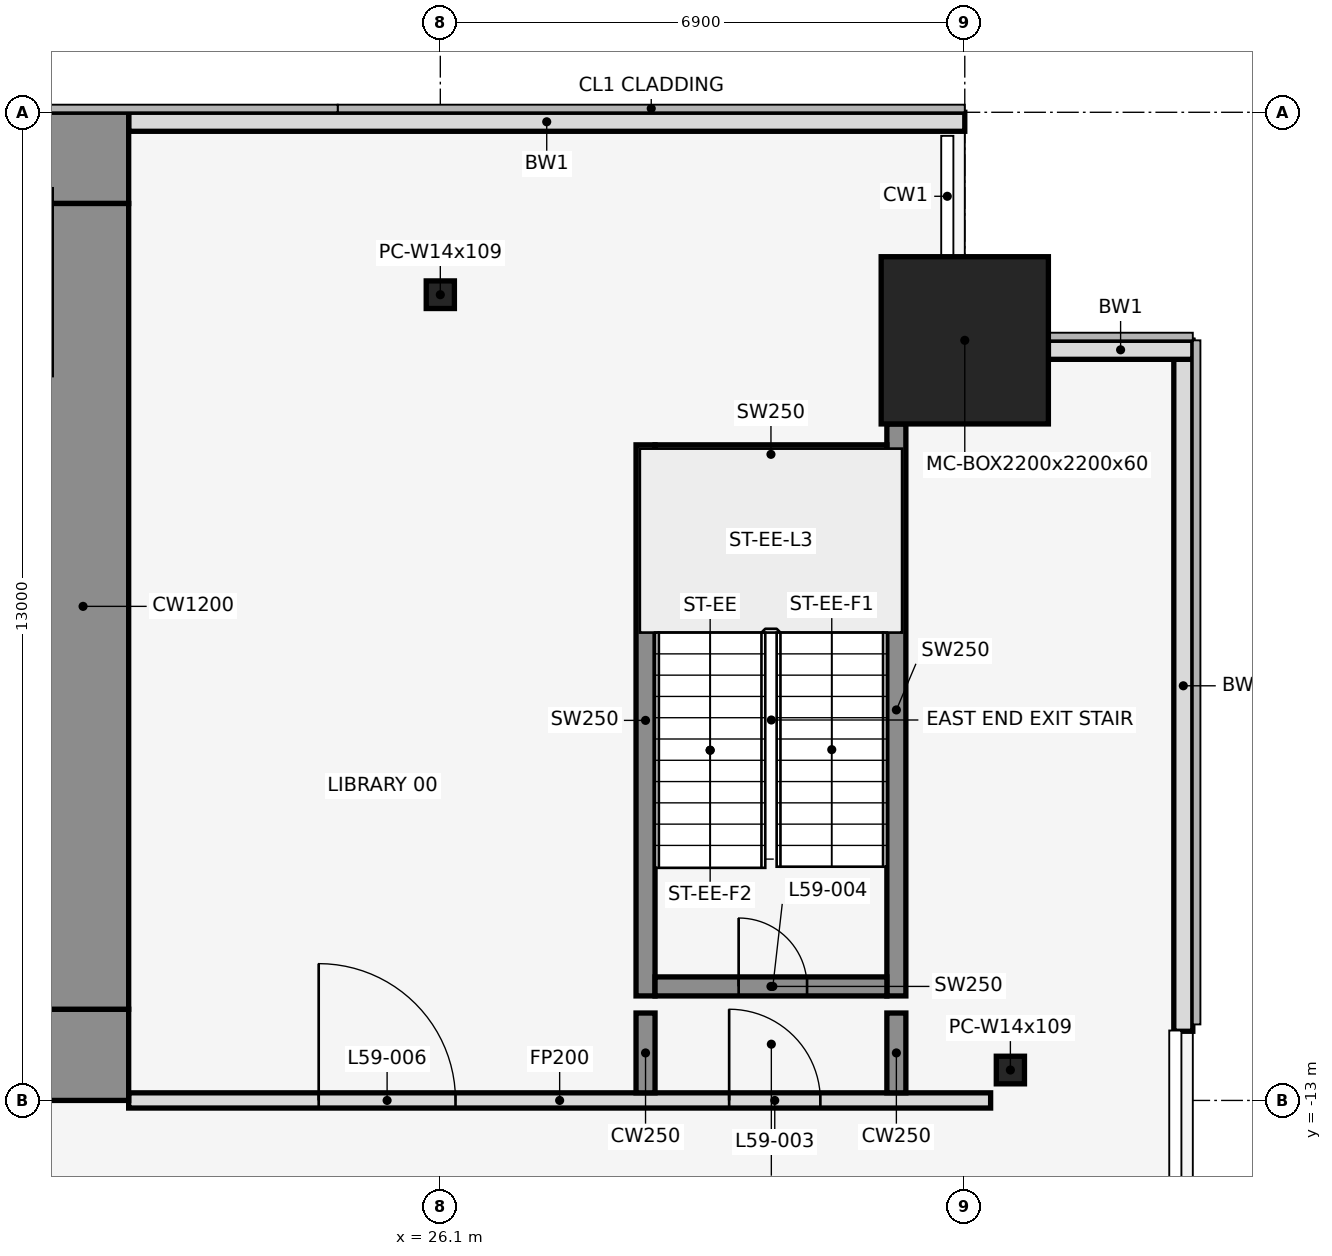
"""IFC4 building model, lengths in metres.
Left out: names, types, materials, properties, quantities, classifications, styles, units other than length and angle.
Written with IfcOpenShell. Run it as: python <this file> out.ifc"""

import sys

from ifc_helpers import new_model, si_unit, direction, frame, frame_2d, origin, origin_2d, place, context, subcontext, project, spatial, rectangle, hollow_rectangle, i_section, extrude, element, fill, save


model = new_model("IFC4")
c1 = context("Model", 3, precision=1e-05, world=origin(), true_north=direction((0.0, 1.0)))
c2 = subcontext(c1, "Body", "Model", "MODEL_VIEW")
j1 = project(units=[si_unit("LENGTHUNIT", "METRE"), si_unit("PLANEANGLEUNIT", "RADIAN")], contexts=[c1])
p1 = place(None, origin())
s1 = spatial("IfcSite", under=j1, at=p1, CompositionType="ELEMENT")
p2 = place(p1, origin())
s2 = spatial("IfcBuilding", under=s1, at=p2, CompositionType="ELEMENT")
p3 = place(p2, frame((0.0, 0.0, 262.4)))
s3 = spatial("IfcBuildingStorey", under=s2, at=p3, CompositionType="ELEMENT", Elevation=262.4)
p4 = place(p3, frame((26.1, -2.4, 0.0), z_axis=(0.0, 0.0, 1.0), x_axis=(1.0, 0.0, 0.0)))
e1 = element("IfcColumn", 1, at=p4, inside=s3, PredefinedType="COLUMN", context=c2, shape_type="SweptSolid", body=[
    extrude(i_section(OverallWidth=0.371, OverallDepth=0.363, WebThickness=0.013, FlangeThickness=0.022, at=origin_2d()), origin(), (0.0, 0.0, 1.0), 4.2),
])
p5 = place(p3, frame((33.0, -3.0, 0.0), z_axis=(0.0, 0.0, 1.0), x_axis=(1.0, 0.0, 0.0)))
e2 = element("IfcColumn", 2, at=p5, inside=s3, PredefinedType="COLUMN", context=c2, shape_type="SweptSolid", body=[
    extrude(hollow_rectangle(XDim=2.2, YDim=2.2, WallThickness=0.06, at=origin_2d()), origin(), (0.0, 0.0, 1.0), 4.2),
])
p6 = place(p3, frame((33.6, -12.6, 0.0), z_axis=(0.0, 0.0, 1.0), x_axis=(1.0, 0.0, 0.0)))
e3 = element("IfcColumn", 3, at=p6, inside=s3, PredefinedType="COLUMN", context=c2, shape_type="SweptSolid", body=[
    extrude(i_section(OverallWidth=0.371, OverallDepth=0.363, WebThickness=0.013, FlangeThickness=0.022, at=origin_2d()), origin(), (0.0, 0.0, 1.0), 4.2),
])
p7 = place(p3, frame((33.0, -0.125, 0.0), z_axis=(0.0, 0.0, 1.0), x_axis=(-1.0, 0.0, 0.0)))
e4 = element("IfcWall", 4, at=p7, inside=s3, PredefinedType="STANDARD", context=c2, shape_type="SweptSolid", body=[
    extrude(rectangle(XDim=11.0, YDim=0.25, at=frame_2d((5.5, 0.0))), origin(), (0.0, 0.0, 1.0), 4.05),
])
p8 = place(p3, frame((35.875, -12.09, 0.0), z_axis=(0.0, 0.0, 1.0), x_axis=(0.0, 1.0, 0.0)))
e5 = element("IfcWall", 5, at=p8, inside=s3, PredefinedType="STANDARD", context=c2, shape_type="SweptSolid", body=[
    extrude(rectangle(XDim=9.09, YDim=0.25, at=frame_2d((4.545, 0.0))), origin(), (0.0, 0.0, 1.0), 4.05),
])
p9 = place(p3, frame((36.0, -3.125, 0.0), z_axis=(0.0, 0.0, 1.0), x_axis=(-1.0, 0.0, 0.0)))
e6 = element("IfcWall", 6, at=p9, inside=s3, PredefinedType="STANDARD", context=c2, shape_type="SweptSolid", body=[
    extrude(rectangle(XDim=1.9, YDim=0.25, at=frame_2d((0.95, 0.0))), origin(), (0.0, 0.0, 1.0), 4.05),
])
p10 = place(p3, frame((28.8, -11.625, 0.0), z_axis=(0.0, 0.0, 1.0), x_axis=(0.0, 1.0, 0.0)))
e7 = element("IfcWall", 7, at=p10, inside=s3, PredefinedType="SHEAR", context=c2, shape_type="SweptSolid", body=[
    extrude(rectangle(XDim=7.25, YDim=0.25, at=frame_2d((3.625, 0.0))), origin(), (0.0, 0.0, 1.0), 4.2),
])
p11 = place(p3, frame((32.1, -11.625, 0.0), z_axis=(0.0, 0.0, 1.0), x_axis=(0.0, 1.0, 0.0)))
e8 = element("IfcWall", 8, at=p11, inside=s3, PredefinedType="SHEAR", context=c2, shape_type="SweptSolid", body=[
    extrude(rectangle(XDim=7.525, YDim=0.25, at=frame_2d((3.762, 0.0))), origin(), (0.0, 0.0, 1.0), 4.2),
])
p12 = place(p3, frame((28.925, -11.5, 0.0), z_axis=(0.0, 0.0, 1.0), x_axis=(1.0, 0.0, 0.0)))
e9 = element("IfcWall", 9, at=p12, inside=s3, PredefinedType="SHEAR", context=c2, shape_type="SweptSolid", body=[
    extrude(rectangle(XDim=3.05, YDim=0.25, at=frame_2d((1.525, 0.0))), origin(), (0.0, 0.0, 1.0), 4.2),
])
p13 = place(p12, frame((1.1, 0.0, 0.0)))
e10 = element("IfcOpeningElement", 10, at=p13, cuts=e9, PredefinedType="OPENING", context=c2, shape_type="SweptSolid", body=[
    extrude(rectangle(XDim=0.9, YDim=2.1, at=frame_2d((0.45, 1.05))), frame((0.0, 0.137, 0.0), z_axis=(0.0, -1.0, 0.0), x_axis=(1.0, 0.0, 0.0)), (0.0, 0.0, 1.0), 0.274),
])
p14 = place(p3, frame((28.925, -4.5, 0.0), z_axis=(0.0, 0.0, 1.0), x_axis=(1.0, 0.0, 0.0)))
e11 = element("IfcWall", 11, at=p14, inside=s3, PredefinedType="SHEAR", context=c2, shape_type="SweptSolid", body=[
    extrude(rectangle(XDim=3.05, YDim=0.25, at=frame_2d((1.525, 0.0))), origin(), (0.0, 0.0, 1.0), 4.2),
])
p15 = place(p3, frame((22.0, -13.0, 0.0), z_axis=(0.0, 0.0, 1.0), x_axis=(1.0, 0.0, 0.0)))
e12 = element("IfcWall", 12, at=p15, inside=s3, PredefinedType="PARTITIONING", context=c2, shape_type="SweptSolid", body=[
    extrude(rectangle(XDim=11.34, YDim=0.2, at=frame_2d((5.67, 0.0))), origin(), (0.0, 0.0, 1.0), 3.118),
])
p16 = place(p15, frame((7.9, 0.0, 0.0)))
e13 = element("IfcOpeningElement", 13, at=p16, cuts=e12, PredefinedType="OPENING", context=c2, shape_type="SweptSolid", body=[
    extrude(rectangle(XDim=1.2, YDim=2.1, at=frame_2d((0.6, 1.05))), frame((0.0, 0.112, 0.0), z_axis=(0.0, -1.0, 0.0), x_axis=(1.0, 0.0, 0.0)), (0.0, 0.0, 1.0), 0.224),
])
p17 = place(p15, frame((2.5, 0.0, 0.0)))
e14 = element("IfcOpeningElement", 14, at=p17, cuts=e12, PredefinedType="OPENING", context=c2, shape_type="SweptSolid", body=[
    extrude(rectangle(XDim=1.8, YDim=2.1, at=frame_2d((0.9, 1.05))), frame((0.0, 0.112, 0.0), z_axis=(0.0, -1.0, 0.0), x_axis=(1.0, 0.0, 0.0)), (0.0, 0.0, 1.0), 0.224),
])
for number, where, z_axis, x_axis in (
    (15, (28.8, -12.9, 0.0), (0.0, 0.0, 1.0), (0.0, 1.0, 0.0)),
    (16, (32.1, -12.9, 0.0), (0.0, 0.0, 1.0), (0.0, 1.0, 0.0)),
):
    element("IfcWall", number, at=place(p3, frame(where, z_axis=z_axis, x_axis=x_axis)), inside=s3, PredefinedType="SHEAR", context=c2, shape_type="SweptSolid", body=[
        extrude(rectangle(XDim=1.05, YDim=0.25, at=frame_2d((0.525, 0.0))), origin(), (0.0, 0.0, 1.0), 4.2),
    ])
p18 = place(p3, frame((-22.0, -0.6, 0.0), z_axis=(0.0, 0.0, 1.0), x_axis=(1.0, 0.0, 0.0)))
e17 = element("IfcWall", 17, at=p18, inside=s3, PredefinedType="SHEAR", context=c2, shape_type="SweptSolid", body=[
    extrude(rectangle(XDim=44.0, YDim=1.2, at=frame_2d((22.0, 0.0))), origin(), (0.0, 0.0, 1.0), 4.2),
])
p19 = place(p18, frame((18.55, 0.0, 0.0)))
e18 = element("IfcOpeningElement", 18, at=p19, cuts=e17, PredefinedType="OPENING", context=c2, shape_type="SweptSolid", body=[
    extrude(rectangle(XDim=0.9, YDim=2.1, at=frame_2d((0.45, 1.05))), frame((0.0, 0.612, 0.0), z_axis=(0.0, -1.0, 0.0), x_axis=(1.0, 0.0, 0.0)), (0.0, 0.0, 1.0), 1.224),
])
p20 = place(p18, frame((24.55, 0.0, 0.0)))
e19 = element("IfcOpeningElement", 19, at=p20, cuts=e17, PredefinedType="OPENING", context=c2, shape_type="SweptSolid", body=[
    extrude(rectangle(XDim=0.9, YDim=2.1, at=frame_2d((0.45, 1.05))), frame((0.0, 0.612, 0.0), z_axis=(0.0, -1.0, 0.0), x_axis=(1.0, 0.0, 0.0)), (0.0, 0.0, 1.0), 1.224),
])
p21 = place(p3, frame((-22.0, -12.4, 0.0), z_axis=(0.0, 0.0, 1.0), x_axis=(1.0, 0.0, 0.0)))
e20 = element("IfcWall", 20, at=p21, inside=s3, PredefinedType="SHEAR", context=c2, shape_type="SweptSolid", body=[
    extrude(rectangle(XDim=44.0, YDim=1.2, at=frame_2d((22.0, 0.0))), origin(), (0.0, 0.0, 1.0), 4.2),
])
p22 = place(p21, frame((2.2, 0.0, 0.0)))
e21 = element("IfcOpeningElement", 21, at=p22, cuts=e20, PredefinedType="OPENING", context=c2, shape_type="SweptSolid", body=[
    extrude(rectangle(XDim=1.2, YDim=2.1, at=frame_2d((0.6, 1.05))), frame((0.0, 0.612, 0.0), z_axis=(0.0, -1.0, 0.0), x_axis=(1.0, 0.0, 0.0)), (0.0, 0.0, 1.0), 1.224),
])
p23 = place(p21, frame((21.4, 0.0, 0.0)))
e22 = element("IfcOpeningElement", 22, at=p23, cuts=e20, PredefinedType="OPENING", context=c2, shape_type="SweptSolid", body=[
    extrude(rectangle(XDim=1.2, YDim=2.1, at=frame_2d((0.6, 1.05))), frame((0.0, 0.612, 0.0), z_axis=(0.0, -1.0, 0.0), x_axis=(1.0, 0.0, 0.0)), (0.0, 0.0, 1.0), 1.224),
])
p24 = place(p21, frame((40.6, 0.0, 0.0)))
e23 = element("IfcOpeningElement", 23, at=p24, cuts=e20, PredefinedType="OPENING", context=c2, shape_type="SweptSolid", body=[
    extrude(rectangle(XDim=1.2, YDim=2.1, at=frame_2d((0.6, 1.05))), frame((0.0, 0.612, 0.0), z_axis=(0.0, -1.0, 0.0), x_axis=(1.0, 0.0, 0.0)), (0.0, 0.0, 1.0), 1.224),
])
p25 = place(p21, frame((16.0, 0.0, 0.0)))
e24 = element("IfcOpeningElement", 24, at=p25, cuts=e20, PredefinedType="OPENING", context=c2, shape_type="SweptSolid", body=[
    extrude(rectangle(XDim=1.8, YDim=2.1, at=frame_2d((0.9, 1.05))), frame((0.0, 0.612, 0.0), z_axis=(0.0, -1.0, 0.0), x_axis=(1.0, 0.0, 0.0)), (0.0, 0.0, 1.0), 1.224),
])
p26 = place(p21, frame((6.3, 0.0, 0.0)))
e25 = element("IfcOpeningElement", 25, at=p26, cuts=e20, PredefinedType="OPENING", context=c2, shape_type="SweptSolid", body=[
    extrude(rectangle(XDim=1.2, YDim=2.1, at=frame_2d((0.6, 1.05))), frame((0.0, 0.612, 0.0), z_axis=(0.0, -1.0, 0.0), x_axis=(1.0, 0.0, 0.0)), (0.0, 0.0, 1.0), 1.224),
])
p27 = place(p21, frame((26.2, 0.0, 0.0)))
e26 = element("IfcOpeningElement", 26, at=p27, cuts=e20, PredefinedType="OPENING", context=c2, shape_type="SweptSolid", body=[
    extrude(rectangle(XDim=1.8, YDim=2.1, at=frame_2d((0.9, 1.05))), frame((0.0, 0.612, 0.0), z_axis=(0.0, -1.0, 0.0), x_axis=(1.0, 0.0, 0.0)), (0.0, 0.0, 1.0), 1.224),
])
p28 = place(p21, frame((36.5, 0.0, 0.0)))
e27 = element("IfcOpeningElement", 27, at=p28, cuts=e20, PredefinedType="OPENING", context=c2, shape_type="SweptSolid", body=[
    extrude(rectangle(XDim=1.2, YDim=2.1, at=frame_2d((0.6, 1.05))), frame((0.0, 0.612, 0.0), z_axis=(0.0, -1.0, 0.0), x_axis=(1.0, 0.0, 0.0)), (0.0, 0.0, 1.0), 1.224),
])
p29 = place(p3, frame((21.4, -11.8, 0.0), z_axis=(0.0, 0.0, 1.0), x_axis=(0.0, 1.0, 0.0)))
e28 = element("IfcWall", 28, at=p29, inside=s3, PredefinedType="SHEAR", context=c2, shape_type="SweptSolid", body=[
    extrude(rectangle(XDim=10.6, YDim=1.2, at=frame_2d((5.3, 0.0))), origin(), (0.0, 0.0, 1.0), 4.2),
])
p30 = place(p16, origin())
e29 = element("IfcDoor", 29, at=p30, inside=s3, OperationType="SINGLE_SWING_RIGHT", PredefinedType="DOOR", context=c2, shape_type="SweptSolid", body=[
    extrude(rectangle(XDim=1.2, YDim=2.1, at=frame_2d((0.6, 1.05))), frame((0.0, 0.025, 0.0), z_axis=(0.0, -1.0, 0.0), x_axis=(1.0, 0.0, 0.0)), (0.0, 0.0, 1.0), 0.05),
])
fill(e13, e29)
p31 = place(p13, origin())
e30 = element("IfcDoor", 30, at=p31, inside=s3, OperationType="SINGLE_SWING_LEFT", PredefinedType="DOOR", context=c2, shape_type="SweptSolid", body=[
    extrude(rectangle(XDim=0.9, YDim=2.1, at=frame_2d((0.45, 1.05))), frame((0.0, 0.025, 0.0), z_axis=(0.0, -1.0, 0.0), x_axis=(1.0, 0.0, 0.0)), (0.0, 0.0, 1.0), 0.05),
])
fill(e10, e30)
p32 = place(p17, origin())
e31 = element("IfcDoor", 31, at=p32, inside=s3, OperationType="SINGLE_SWING_LEFT", PredefinedType="DOOR", context=c2, shape_type="SweptSolid", body=[
    extrude(rectangle(XDim=1.8, YDim=2.1, at=frame_2d((0.9, 1.05))), frame((0.0, 0.025, 0.0), z_axis=(0.0, -1.0, 0.0), x_axis=(1.0, 0.0, 0.0)), (0.0, 0.0, 1.0), 0.05),
])
fill(e14, e31)
save(model, sys.argv[1])
